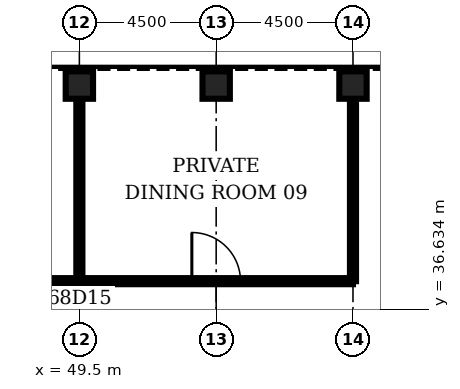
"""IFC4 building model, lengths in metres.
Left out: names, types, materials, properties, quantities, classifications, styles, units other than length and angle.
Written with IfcOpenShell. Run it as: python <this file> out.ifc"""

import sys

from ifc_helpers import new_model, si_unit, direction, frame, frame_2d, origin, origin_2d, place, context, subcontext, project, spatial, rectangle, hollow_rectangle, extrude, element, fill, save


model = new_model("IFC4")
c1 = context("Model", 3, precision=1e-05, world=origin(), true_north=direction((0.0, 1.0)))
c2 = subcontext(c1, "Body", "Model", "MODEL_VIEW")
j1 = project(units=[si_unit("LENGTHUNIT", "METRE"), si_unit("PLANEANGLEUNIT", "RADIAN")], contexts=[c1])
p1 = place(None, origin())
s1 = spatial("IfcSite", under=j1, at=p1, CompositionType="ELEMENT")
p2 = place(p1, origin())
s2 = spatial("IfcBuilding", under=s1, at=p2, CompositionType="ELEMENT")
p3 = place(p2, frame((0.0, 0.0, 300.5)))
s3 = spatial("IfcBuildingStorey", under=s2, at=p3, CompositionType="ELEMENT", Elevation=300.5)
for number, where, z_axis, x_axis in (
    (1, (58.5, 44.0, 0.0), (0.0, 0.0, 1.0), (0.0, 1.0, 0.0)),
    (2, (54.0, 44.0, 0.0), (0.0, 0.0, 1.0), (0.0, 1.0, 0.0)),
    (3, (49.5, 44.0, 0.0), (0.0, 0.0, 1.0), (0.0, 1.0, 0.0)),
):
    element("IfcColumn", number, at=place(p3, frame(where, z_axis=z_axis, x_axis=x_axis)), inside=s3, PredefinedType="COLUMN", context=c2, shape_type="SweptSolid", body=[
        extrude(hollow_rectangle(XDim=0.9, YDim=0.9, WallThickness=0.06, at=origin_2d()), origin(), (0.0, 0.0, 1.0), 4.2),
    ])
p4 = place(p3, frame((31.5, 37.55, 0.0), z_axis=(0.0, 0.0, 1.0), x_axis=(1.0, 0.0, 0.0)))
e4 = element("IfcWall", 4, at=p4, inside=s3, PredefinedType="PARTITIONING", context=c2, shape_type="SweptSolid", body=[
    extrude(rectangle(XDim=27.0, YDim=0.2, at=frame_2d((13.5, 0.0))), origin(), (0.0, 0.0, 1.0), 3.0),
])
p5 = place(p4, frame((3.7, 0.0, 0.0)))
e5 = element("IfcOpeningElement", 5, at=p5, cuts=e4, PredefinedType="OPENING", context=c2, shape_type="SweptSolid", body=[
    extrude(rectangle(XDim=1.6, YDim=2.1, at=frame_2d((0.8, 1.05))), frame((0.0, 0.11, 0.0), z_axis=(0.0, -1.0, 0.0), x_axis=(1.0, 0.0, 0.0)), (0.0, 0.0, 1.0), 0.22),
])
p6 = place(p4, frame((12.7, 0.0, 0.0)))
e6 = element("IfcOpeningElement", 6, at=p6, cuts=e4, PredefinedType="OPENING", context=c2, shape_type="SweptSolid", body=[
    extrude(rectangle(XDim=1.6, YDim=2.1, at=frame_2d((0.8, 1.05))), frame((0.0, 0.11, 0.0), z_axis=(0.0, -1.0, 0.0), x_axis=(1.0, 0.0, 0.0)), (0.0, 0.0, 1.0), 0.22),
])
p7 = place(p4, frame((21.7, 0.0, 0.0)))
e7 = element("IfcOpeningElement", 7, at=p7, cuts=e4, PredefinedType="OPENING", context=c2, shape_type="SweptSolid", body=[
    extrude(rectangle(XDim=1.6, YDim=2.1, at=frame_2d((0.8, 1.05))), frame((0.0, 0.11, 0.0), z_axis=(0.0, -1.0, 0.0), x_axis=(1.0, 0.0, 0.0)), (0.0, 0.0, 1.0), 0.22),
])
p8 = place(p3, frame((49.5, 32.35, 0.0), z_axis=(0.0, 0.0, 1.0), x_axis=(0.0, 1.0, 0.0)))
e8 = element("IfcWall", 8, at=p8, inside=s3, PredefinedType="PARTITIONING", context=c2, shape_type="SweptSolid", body=[
    extrude(rectangle(XDim=5.2, YDim=0.1, at=frame_2d((2.6, 0.0))), origin(), (0.0, 0.0, 1.0), 3.0),
])
p9 = place(p8, frame((1.8, 0.0, 0.0)))
e9 = element("IfcOpeningElement", 9, at=p9, cuts=e8, PredefinedType="OPENING", context=c2, shape_type="SweptSolid", body=[
    extrude(rectangle(XDim=1.6, YDim=2.1, at=frame_2d((0.8, 1.05))), frame((0.0, 0.06, 0.0), z_axis=(0.0, -1.0, 0.0), x_axis=(1.0, 0.0, 0.0)), (0.0, 0.0, 1.0), 0.12),
])
for number, where, z_axis, x_axis in (
    (10, (49.5, 37.55, 0.0), (0.0, 0.0, 1.0), (0.0, 1.0, 0.0)),
    (11, (58.5, 37.55, 0.0), (0.0, 0.0, 1.0), (0.0, 1.0, 0.0)),
):
    element("IfcWall", number, at=place(p3, frame(where, z_axis=z_axis, x_axis=x_axis)), inside=s3, PredefinedType="PARTITIONING", context=c2, shape_type="SweptSolid", body=[
        extrude(rectangle(XDim=6.0, YDim=0.2, at=frame_2d((3.0, 0.0))), origin(), (0.0, 0.0, 1.0), 3.0),
    ])
p10 = place(p7, origin())
e12 = element("IfcDoor", 12, at=p10, inside=s3, OperationType="SINGLE_SWING_LEFT", PredefinedType="DOOR", context=c2, shape_type="SweptSolid", body=[
    extrude(rectangle(XDim=1.6, YDim=2.1, at=frame_2d((0.8, 1.05))), frame((0.0, 0.025, 0.0), z_axis=(0.0, -1.0, 0.0), x_axis=(1.0, 0.0, 0.0)), (0.0, 0.0, 1.0), 0.05),
])
fill(e7, e12)
save(model, sys.argv[1])
